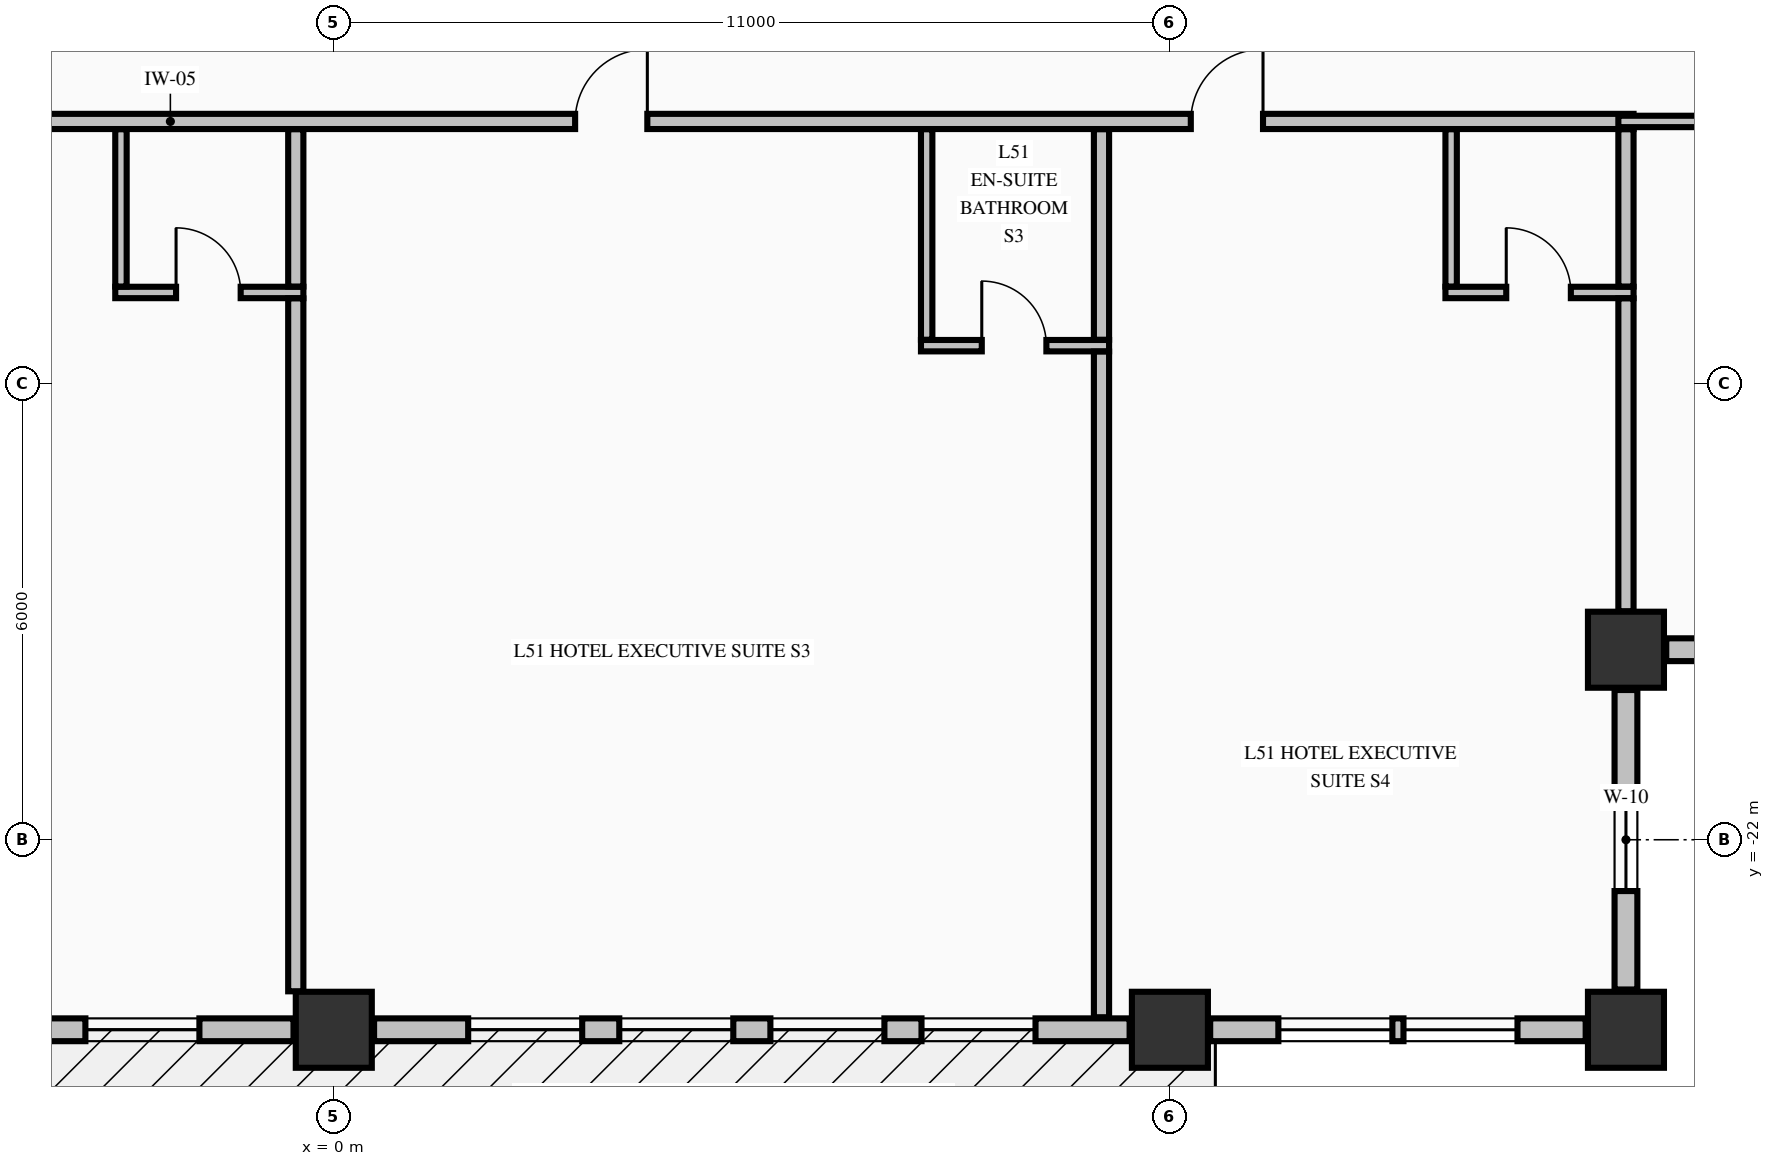
"""IFC4 building model, lengths in metres.
Left out: names, types, materials, properties, quantities, classifications, styles, units other than length and angle.
Written with IfcOpenShell. Run it as: python <this file> out.ifc"""

import sys

from ifc_helpers import new_model, si_unit, direction, frame, frame_2d, origin, origin_2d, place, context, subcontext, project, spatial, rectangle, extrude, element, fill, save


model = new_model("IFC4")
c1 = context("Model", 3, precision=1e-05, world=origin(), true_north=direction((0.0, 1.0)))
c2 = subcontext(c1, "Body", "Model", "MODEL_VIEW")
j1 = project(units=[si_unit("LENGTHUNIT", "METRE"), si_unit("PLANEANGLEUNIT", "RADIAN")], contexts=[c1])
p1 = place(None, origin())
s1 = spatial("IfcSite", under=j1, at=p1, CompositionType="ELEMENT")
p2 = place(p1, origin())
s2 = spatial("IfcBuilding", under=s1, at=p2, CompositionType="ELEMENT")
p3 = place(p2, frame((0.0, 0.0, 198.26)))
s3 = spatial("IfcBuildingStorey", under=s2, at=p3, CompositionType="ELEMENT", Elevation=198.26)
for number, where, z_axis, x_axis in (
    (1, (0.0, -24.5, -0.25), (0.0, 0.0, 1.0), (1.0, 0.0, 0.0)),
    (2, (11.0, -24.5, -0.25), (0.0, 0.0, 1.0), (1.0, 0.0, 0.0)),
    (3, (17.0, -24.5, -0.25), (0.0, 0.0, 1.0), (1.0, 0.0, 0.0)),
    (4, (17.0, -19.5, -0.25), (0.0, 0.0, 1.0), (1.0, 0.0, 0.0)),
):
    element("IfcColumn", number, at=place(p3, frame(where, z_axis=z_axis, x_axis=x_axis)), inside=s3, PredefinedType="COLUMN", context=c2, shape_type="SweptSolid", body=[
        extrude(rectangle(XDim=1.0, YDim=1.0, at=origin_2d()), origin(), (0.0, 0.0, 1.0), 3.4),
    ])
p4 = place(p3, frame((17.0, -23.97, 0.0), z_axis=(0.0, 0.0, 1.0), x_axis=(0.0, 1.0, 0.0)))
e5 = element("IfcWall", 5, at=p4, inside=s3, PredefinedType="STANDARD", context=c2, shape_type="SweptSolid", body=[
    extrude(rectangle(XDim=3.94, YDim=0.3, at=frame_2d((1.97, 0.0))), origin(), (0.0, 0.0, 1.0), 2.542),
])
p5 = place(p4, frame((1.295, 0.0, 0.68)))
e6 = element("IfcOpeningElement", 6, at=p5, cuts=e5, PredefinedType="OPENING", context=c2, shape_type="SweptSolid", body=[
    extrude(rectangle(XDim=1.35, YDim=1.42, at=frame_2d((0.675, 0.71))), frame((0.0, 0.16, 0.0), z_axis=(0.0, -1.0, 0.0), x_axis=(1.0, 0.0, 0.0)), (0.0, 0.0, 1.0), 0.32),
])
p6 = place(p3, frame((17.53, -19.5, 0.0), z_axis=(0.0, 0.0, 1.0), x_axis=(1.0, 0.0, 0.0)))
e7 = element("IfcWall", 7, at=p6, inside=s3, PredefinedType="STANDARD", context=c2, shape_type="SweptSolid", body=[
    extrude(rectangle(XDim=3.94, YDim=0.3, at=frame_2d((1.97, 0.0))), origin(), (0.0, 0.0, 1.0), 2.542),
])
p7 = place(p6, frame((1.295, 0.0, 0.68)))
e8 = element("IfcOpeningElement", 8, at=p7, cuts=e7, PredefinedType="OPENING", context=c2, shape_type="SweptSolid", body=[
    extrude(rectangle(XDim=1.35, YDim=1.42, at=frame_2d((0.675, 0.71))), frame((0.0, 0.16, 0.0), z_axis=(0.0, -1.0, 0.0), x_axis=(1.0, 0.0, 0.0)), (0.0, 0.0, 1.0), 0.32),
])
p8 = place(p3, frame((-10.47, -24.5, 0.0), z_axis=(0.0, 0.0, 1.0), x_axis=(1.0, 0.0, 0.0)))
e9 = element("IfcWall", 9, at=p8, inside=s3, PredefinedType="STANDARD", context=c2, shape_type="SweptSolid", body=[
    extrude(rectangle(XDim=9.94, YDim=0.3, at=frame_2d((4.97, 0.0))), origin(), (0.0, 0.0, 1.0), 2.542),
])
p9 = place(p8, frame((3.013, 0.0, 0.0)))
e10 = element("IfcOpeningElement", 10, at=p9, cuts=e9, PredefinedType="OPENING", context=c2, shape_type="SweptSolid", body=[
    extrude(rectangle(XDim=1.1, YDim=2.15, at=frame_2d((0.55, 1.075))), frame((0.0, 0.16, 0.0), z_axis=(0.0, -1.0, 0.0), x_axis=(1.0, 0.0, 0.0)), (0.0, 0.0, 1.0), 0.32),
])
p10 = place(p8, frame((5.214, 0.0, 0.72)))
e11 = element("IfcOpeningElement", 11, at=p10, cuts=e9, PredefinedType="OPENING", context=c2, shape_type="SweptSolid", body=[
    extrude(rectangle(XDim=1.5, YDim=1.6, at=frame_2d((0.75, 0.8))), frame((0.0, 0.16, 0.0), z_axis=(0.0, -1.0, 0.0), x_axis=(1.0, 0.0, 0.0)), (0.0, 0.0, 1.0), 0.32),
])
p11 = place(p8, frame((7.202, 0.0, 0.72)))
e12 = element("IfcOpeningElement", 12, at=p11, cuts=e9, PredefinedType="OPENING", context=c2, shape_type="SweptSolid", body=[
    extrude(rectangle(XDim=1.5, YDim=1.6, at=frame_2d((0.75, 0.8))), frame((0.0, 0.16, 0.0), z_axis=(0.0, -1.0, 0.0), x_axis=(1.0, 0.0, 0.0)), (0.0, 0.0, 1.0), 0.32),
])
p12 = place(p3, frame((0.53, -24.5, 0.0), z_axis=(0.0, 0.0, 1.0), x_axis=(1.0, 0.0, 0.0)))
e13 = element("IfcWall", 13, at=p12, inside=s3, PredefinedType="STANDARD", context=c2, shape_type="SweptSolid", body=[
    extrude(rectangle(XDim=9.94, YDim=0.3, at=frame_2d((4.97, 0.0))), origin(), (0.0, 0.0, 1.0), 2.542),
])
p13 = place(p12, frame((1.238, 0.0, 0.72)))
e14 = element("IfcOpeningElement", 14, at=p13, cuts=e13, PredefinedType="OPENING", context=c2, shape_type="SweptSolid", body=[
    extrude(rectangle(XDim=1.5, YDim=1.6, at=frame_2d((0.75, 0.8))), frame((0.0, 0.16, 0.0), z_axis=(0.0, -1.0, 0.0), x_axis=(1.0, 0.0, 0.0)), (0.0, 0.0, 1.0), 0.32),
])
p14 = place(p12, frame((3.226, 0.0, 0.72)))
e15 = element("IfcOpeningElement", 15, at=p14, cuts=e13, PredefinedType="OPENING", context=c2, shape_type="SweptSolid", body=[
    extrude(rectangle(XDim=1.5, YDim=1.6, at=frame_2d((0.75, 0.8))), frame((0.0, 0.16, 0.0), z_axis=(0.0, -1.0, 0.0), x_axis=(1.0, 0.0, 0.0)), (0.0, 0.0, 1.0), 0.32),
])
p15 = place(p12, frame((5.214, 0.0, 0.72)))
e16 = element("IfcOpeningElement", 16, at=p15, cuts=e13, PredefinedType="OPENING", context=c2, shape_type="SweptSolid", body=[
    extrude(rectangle(XDim=1.5, YDim=1.6, at=frame_2d((0.75, 0.8))), frame((0.0, 0.16, 0.0), z_axis=(0.0, -1.0, 0.0), x_axis=(1.0, 0.0, 0.0)), (0.0, 0.0, 1.0), 0.32),
])
p16 = place(p12, frame((7.202, 0.0, 0.72)))
e17 = element("IfcOpeningElement", 17, at=p16, cuts=e13, PredefinedType="OPENING", context=c2, shape_type="SweptSolid", body=[
    extrude(rectangle(XDim=1.5, YDim=1.6, at=frame_2d((0.75, 0.8))), frame((0.0, 0.16, 0.0), z_axis=(0.0, -1.0, 0.0), x_axis=(1.0, 0.0, 0.0)), (0.0, 0.0, 1.0), 0.32),
])
p17 = place(p3, frame((11.53, -24.5, 0.0), z_axis=(0.0, 0.0, 1.0), x_axis=(1.0, 0.0, 0.0)))
e18 = element("IfcWall", 18, at=p17, inside=s3, PredefinedType="STANDARD", context=c2, shape_type="SweptSolid", body=[
    extrude(rectangle(XDim=4.94, YDim=0.3, at=frame_2d((2.47, 0.0))), origin(), (0.0, 0.0, 1.0), 2.542),
])
p18 = place(p17, frame((0.897, 0.0, 0.72)))
e19 = element("IfcOpeningElement", 19, at=p18, cuts=e18, PredefinedType="OPENING", context=c2, shape_type="SweptSolid", body=[
    extrude(rectangle(XDim=1.5, YDim=1.6, at=frame_2d((0.75, 0.8))), frame((0.0, 0.16, 0.0), z_axis=(0.0, -1.0, 0.0), x_axis=(1.0, 0.0, 0.0)), (0.0, 0.0, 1.0), 0.32),
])
p19 = place(p17, frame((2.543, 0.0, 0.72)))
e20 = element("IfcOpeningElement", 20, at=p19, cuts=e18, PredefinedType="OPENING", context=c2, shape_type="SweptSolid", body=[
    extrude(rectangle(XDim=1.5, YDim=1.6, at=frame_2d((0.75, 0.8))), frame((0.0, 0.16, 0.0), z_axis=(0.0, -1.0, 0.0), x_axis=(1.0, 0.0, 0.0)), (0.0, 0.0, 1.0), 0.32),
])
p20 = place(p3, frame((7.725, -15.5, 0.0), z_axis=(0.0, 0.0, 1.0), x_axis=(1.0, 0.0, 0.0)))
e21 = element("IfcWall", 21, at=p20, inside=s3, PredefinedType="PARTITIONING", context=c2, shape_type="SweptSolid", body=[
    extrude(rectangle(XDim=2.475, YDim=0.15, at=frame_2d((1.237, 0.0))), origin(), (0.0, 0.0, 1.0), 3.15),
])
p21 = place(p20, frame((0.8, 0.0, 0.0)))
e22 = element("IfcOpeningElement", 22, at=p21, cuts=e21, PredefinedType="OPENING", context=c2, shape_type="SweptSolid", body=[
    extrude(rectangle(XDim=0.85, YDim=2.1, at=frame_2d((0.425, 1.05))), frame((0.0, 0.085, 0.0), z_axis=(0.0, -1.0, 0.0), x_axis=(1.0, 0.0, 0.0)), (0.0, 0.0, 1.0), 0.17),
])
p22 = place(p3, frame((-2.875, -14.8, 0.0), z_axis=(0.0, 0.0, 1.0), x_axis=(1.0, 0.0, 0.0)))
e23 = element("IfcWall", 23, at=p22, inside=s3, PredefinedType="PARTITIONING", context=c2, shape_type="SweptSolid", body=[
    extrude(rectangle(XDim=2.475, YDim=0.15, at=frame_2d((1.238, 0.0))), origin(), (0.0, 0.0, 1.0), 3.15),
])
p23 = place(p22, frame((0.8, 0.0, 0.0)))
e24 = element("IfcOpeningElement", 24, at=p23, cuts=e23, PredefinedType="OPENING", context=c2, shape_type="SweptSolid", body=[
    extrude(rectangle(XDim=0.85, YDim=2.1, at=frame_2d((0.425, 1.05))), frame((0.0, 0.085, 0.0), z_axis=(0.0, -1.0, 0.0), x_axis=(1.0, 0.0, 0.0)), (0.0, 0.0, 1.0), 0.17),
])
p24 = place(p3, frame((14.625, -14.8, 0.0), z_axis=(0.0, 0.0, 1.0), x_axis=(1.0, 0.0, 0.0)))
e25 = element("IfcWall", 25, at=p24, inside=s3, PredefinedType="PARTITIONING", context=c2, shape_type="SweptSolid", body=[
    extrude(rectangle(XDim=2.475, YDim=0.15, at=frame_2d((1.238, 0.0))), origin(), (0.0, 0.0, 1.0), 3.15),
])
p25 = place(p24, frame((0.8, 0.0, 0.0)))
e26 = element("IfcOpeningElement", 26, at=p25, cuts=e25, PredefinedType="OPENING", context=c2, shape_type="SweptSolid", body=[
    extrude(rectangle(XDim=0.85, YDim=2.1, at=frame_2d((0.425, 1.05))), frame((0.0, 0.085, 0.0), z_axis=(0.0, -1.0, 0.0), x_axis=(1.0, 0.0, 0.0)), (0.0, 0.0, 1.0), 0.17),
])
p26 = place(p3, frame((-22.1, -12.55, 0.0), z_axis=(0.0, 0.0, 1.0), x_axis=(1.0, 0.0, 0.0)))
e27 = element("IfcWall", 27, at=p26, inside=s3, PredefinedType="PARTITIONING", context=c2, shape_type="SweptSolid", body=[
    extrude(rectangle(XDim=39.2, YDim=0.2, at=frame_2d((19.6, 0.0))), origin(), (0.0, 0.0, 1.0), 3.15),
])
p27 = place(p26, frame((4.025, 0.0, 0.0)))
e28 = element("IfcOpeningElement", 28, at=p27, cuts=e27, PredefinedType="OPENING", context=c2, shape_type="SweptSolid", body=[
    extrude(rectangle(XDim=0.95, YDim=2.15, at=frame_2d((0.475, 1.075))), frame((0.0, 0.11, 0.0), z_axis=(0.0, -1.0, 0.0), x_axis=(1.0, 0.0, 0.0)), (0.0, 0.0, 1.0), 0.22),
])
p28 = place(p26, frame((13.675, 0.0, 0.0)))
e29 = element("IfcOpeningElement", 29, at=p28, cuts=e27, PredefinedType="OPENING", context=c2, shape_type="SweptSolid", body=[
    extrude(rectangle(XDim=0.95, YDim=2.15, at=frame_2d((0.475, 1.075))), frame((0.0, 0.11, 0.0), z_axis=(0.0, -1.0, 0.0), x_axis=(1.0, 0.0, 0.0)), (0.0, 0.0, 1.0), 0.22),
])
p29 = place(p26, frame((25.275, 0.0, 0.0)))
e30 = element("IfcOpeningElement", 30, at=p29, cuts=e27, PredefinedType="OPENING", context=c2, shape_type="SweptSolid", body=[
    extrude(rectangle(XDim=0.95, YDim=2.15, at=frame_2d((0.475, 1.075))), frame((0.0, 0.11, 0.0), z_axis=(0.0, -1.0, 0.0), x_axis=(1.0, 0.0, 0.0)), (0.0, 0.0, 1.0), 0.22),
])
p30 = place(p26, frame((33.375, 0.0, 0.0)))
e31 = element("IfcOpeningElement", 31, at=p30, cuts=e27, PredefinedType="OPENING", context=c2, shape_type="SweptSolid", body=[
    extrude(rectangle(XDim=0.95, YDim=2.15, at=frame_2d((0.475, 1.075))), frame((0.0, 0.11, 0.0), z_axis=(0.0, -1.0, 0.0), x_axis=(1.0, 0.0, 0.0)), (0.0, 0.0, 1.0), 0.22),
])
p31 = place(p3, frame((16.9, -12.55, 0.0), z_axis=(0.0, 0.0, 1.0), x_axis=(1.0, 0.0, 0.0)))
e32 = element("IfcWall", 32, at=p31, inside=s3, PredefinedType="PARTITIONING", context=c2, shape_type="SweptSolid", body=[
    extrude(rectangle(XDim=3.175, YDim=0.15, at=frame_2d((1.587, 0.0))), origin(), (0.0, 0.0, 1.0), 3.15),
])
p32 = place(p3, frame((-2.8, -14.722, 0.0), z_axis=(0.0, 0.0, 1.0), x_axis=(0.0, 1.0, 0.0)))
e33 = element("IfcWall", 33, at=p32, inside=s3, PredefinedType="PARTITIONING", context=c2, shape_type="SweptSolid", body=[
    extrude(rectangle(XDim=2.069, YDim=0.15, at=frame_2d((1.034, 0.0))), origin(), (0.0, 0.0, 1.0), 3.15),
])
p33 = place(p3, frame((-0.5, -23.994, 0.0), z_axis=(0.0, 0.0, 1.0), x_axis=(0.0, 1.0, 0.0)))
e34 = element("IfcWall", 34, at=p33, inside=s3, PredefinedType="PARTITIONING", context=c2, shape_type="SweptSolid", body=[
    extrude(rectangle(XDim=9.116, YDim=0.2, at=frame_2d((4.558, 0.0))), origin(), (0.0, 0.0, 1.0), 3.15),
])
p34 = place(p3, frame((-0.5, -14.722, 0.0), z_axis=(0.0, 0.0, 1.0), x_axis=(0.0, 1.0, 0.0)))
e35 = element("IfcWall", 35, at=p34, inside=s3, PredefinedType="PARTITIONING", context=c2, shape_type="SweptSolid", body=[
    extrude(rectangle(XDim=2.069, YDim=0.2, at=frame_2d((1.034, 0.0))), origin(), (0.0, 0.0, 1.0), 3.15),
])
p35 = place(p3, frame((7.8, -15.422, 0.0), z_axis=(0.0, 0.0, 1.0), x_axis=(0.0, 1.0, 0.0)))
e36 = element("IfcWall", 36, at=p35, inside=s3, PredefinedType="PARTITIONING", context=c2, shape_type="SweptSolid", body=[
    extrude(rectangle(XDim=2.769, YDim=0.15, at=frame_2d((1.385, 0.0))), origin(), (0.0, 0.0, 1.0), 3.15),
])
p36 = place(p3, frame((10.1, -24.335, 0.0), z_axis=(0.0, 0.0, 1.0), x_axis=(0.0, 1.0, 0.0)))
e37 = element("IfcWall", 37, at=p36, inside=s3, PredefinedType="PARTITIONING", context=c2, shape_type="SweptSolid", body=[
    extrude(rectangle(XDim=8.757, YDim=0.2, at=frame_2d((4.378, 0.0))), origin(), (0.0, 0.0, 1.0), 3.15),
])
p37 = place(p3, frame((10.1, -15.422, 0.0), z_axis=(0.0, 0.0, 1.0), x_axis=(0.0, 1.0, 0.0)))
e38 = element("IfcWall", 38, at=p37, inside=s3, PredefinedType="PARTITIONING", context=c2, shape_type="SweptSolid", body=[
    extrude(rectangle(XDim=2.769, YDim=0.2, at=frame_2d((1.385, 0.0))), origin(), (0.0, 0.0, 1.0), 3.15),
])
p38 = place(p3, frame((14.7, -14.722, 0.0), z_axis=(0.0, 0.0, 1.0), x_axis=(0.0, 1.0, 0.0)))
e39 = element("IfcWall", 39, at=p38, inside=s3, PredefinedType="PARTITIONING", context=c2, shape_type="SweptSolid", body=[
    extrude(rectangle(XDim=2.069, YDim=0.15, at=frame_2d((1.034, 0.0))), origin(), (0.0, 0.0, 1.0), 3.15),
])
p39 = place(p3, frame((17.0, -18.994, 0.0), z_axis=(0.0, 0.0, 1.0), x_axis=(0.0, 1.0, 0.0)))
e40 = element("IfcWall", 40, at=p39, inside=s3, PredefinedType="PARTITIONING", context=c2, shape_type="SweptSolid", body=[
    extrude(rectangle(XDim=4.116, YDim=0.2, at=frame_2d((2.058, 0.0))), origin(), (0.0, 0.0, 1.0), 3.15),
])
p40 = place(p3, frame((17.0, -14.722, 0.0), z_axis=(0.0, 0.0, 1.0), x_axis=(0.0, 1.0, 0.0)))
e41 = element("IfcWall", 41, at=p40, inside=s3, PredefinedType="PARTITIONING", context=c2, shape_type="SweptSolid", body=[
    extrude(rectangle(XDim=2.069, YDim=0.2, at=frame_2d((1.034, 0.0))), origin(), (0.0, 0.0, 1.0), 3.15),
])
p41 = place(p5, origin())
e42 = element("IfcWindow", 42, at=p41, inside=s3, PartitioningType="SINGLE_PANEL", PredefinedType="WINDOW", context=c2, shape_type="SweptSolid", body=[
    extrude(rectangle(XDim=1.35, YDim=1.42, at=frame_2d((0.675, 0.71))), frame((0.0, 0.03, 0.0), z_axis=(0.0, -1.0, 0.0), x_axis=(1.0, 0.0, 0.0)), (0.0, 0.0, 1.0), 0.06),
])
fill(e6, e42)
p42 = place(p11, origin())
e43 = element("IfcWindow", 43, at=p42, inside=s3, PartitioningType="SINGLE_PANEL", PredefinedType="WINDOW", context=c2, shape_type="SweptSolid", body=[
    extrude(rectangle(XDim=1.5, YDim=1.6, at=frame_2d((0.75, 0.8))), frame((0.0, 0.03, 0.0), z_axis=(0.0, -1.0, 0.0), x_axis=(1.0, 0.0, 0.0)), (0.0, 0.0, 1.0), 0.06),
])
fill(e12, e43)
p43 = place(p13, origin())
e44 = element("IfcWindow", 44, at=p43, inside=s3, PartitioningType="SINGLE_PANEL", PredefinedType="WINDOW", context=c2, shape_type="SweptSolid", body=[
    extrude(rectangle(XDim=1.5, YDim=1.6, at=frame_2d((0.75, 0.8))), frame((0.0, 0.03, 0.0), z_axis=(0.0, -1.0, 0.0), x_axis=(1.0, 0.0, 0.0)), (0.0, 0.0, 1.0), 0.06),
])
fill(e14, e44)
p44 = place(p14, origin())
e45 = element("IfcWindow", 45, at=p44, inside=s3, PartitioningType="SINGLE_PANEL", PredefinedType="WINDOW", context=c2, shape_type="SweptSolid", body=[
    extrude(rectangle(XDim=1.5, YDim=1.6, at=frame_2d((0.75, 0.8))), frame((0.0, 0.03, 0.0), z_axis=(0.0, -1.0, 0.0), x_axis=(1.0, 0.0, 0.0)), (0.0, 0.0, 1.0), 0.06),
])
fill(e15, e45)
p45 = place(p15, origin())
e46 = element("IfcWindow", 46, at=p45, inside=s3, PartitioningType="SINGLE_PANEL", PredefinedType="WINDOW", context=c2, shape_type="SweptSolid", body=[
    extrude(rectangle(XDim=1.5, YDim=1.6, at=frame_2d((0.75, 0.8))), frame((0.0, 0.03, 0.0), z_axis=(0.0, -1.0, 0.0), x_axis=(1.0, 0.0, 0.0)), (0.0, 0.0, 1.0), 0.06),
])
fill(e16, e46)
p46 = place(p16, origin())
e47 = element("IfcWindow", 47, at=p46, inside=s3, PartitioningType="SINGLE_PANEL", PredefinedType="WINDOW", context=c2, shape_type="SweptSolid", body=[
    extrude(rectangle(XDim=1.5, YDim=1.6, at=frame_2d((0.75, 0.8))), frame((0.0, 0.03, 0.0), z_axis=(0.0, -1.0, 0.0), x_axis=(1.0, 0.0, 0.0)), (0.0, 0.0, 1.0), 0.06),
])
fill(e17, e47)
p47 = place(p18, origin())
e48 = element("IfcWindow", 48, at=p47, inside=s3, PartitioningType="SINGLE_PANEL", PredefinedType="WINDOW", context=c2, shape_type="SweptSolid", body=[
    extrude(rectangle(XDim=1.5, YDim=1.6, at=frame_2d((0.75, 0.8))), frame((0.0, 0.03, 0.0), z_axis=(0.0, -1.0, 0.0), x_axis=(1.0, 0.0, 0.0)), (0.0, 0.0, 1.0), 0.06),
])
fill(e19, e48)
p48 = place(p19, origin())
e49 = element("IfcWindow", 49, at=p48, inside=s3, PartitioningType="SINGLE_PANEL", PredefinedType="WINDOW", context=c2, shape_type="SweptSolid", body=[
    extrude(rectangle(XDim=1.5, YDim=1.6, at=frame_2d((0.75, 0.8))), frame((0.0, 0.03, 0.0), z_axis=(0.0, -1.0, 0.0), x_axis=(1.0, 0.0, 0.0)), (0.0, 0.0, 1.0), 0.06),
])
fill(e20, e49)
p49 = place(p23, origin())
e50 = element("IfcDoor", 50, at=p49, inside=s3, OperationType="SINGLE_SWING_LEFT", PredefinedType="DOOR", context=c2, shape_type="SweptSolid", body=[
    extrude(rectangle(XDim=0.85, YDim=2.1, at=frame_2d((0.425, 1.05))), frame((0.0, 0.025, 0.0), z_axis=(0.0, -1.0, 0.0), x_axis=(1.0, 0.0, 0.0)), (0.0, 0.0, 1.0), 0.05),
])
fill(e24, e50)
p50 = place(p29, origin())
e51 = element("IfcDoor", 51, at=p50, inside=s3, OperationType="SINGLE_SWING_RIGHT", PredefinedType="DOOR", context=c2, shape_type="SweptSolid", body=[
    extrude(rectangle(XDim=0.95, YDim=2.15, at=frame_2d((0.475, 1.075))), frame((0.0, 0.025, 0.0), z_axis=(0.0, -1.0, 0.0), x_axis=(1.0, 0.0, 0.0)), (0.0, 0.0, 1.0), 0.05),
])
fill(e30, e51)
p51 = place(p21, origin())
e52 = element("IfcDoor", 52, at=p51, inside=s3, OperationType="SINGLE_SWING_LEFT", PredefinedType="DOOR", context=c2, shape_type="SweptSolid", body=[
    extrude(rectangle(XDim=0.85, YDim=2.1, at=frame_2d((0.425, 1.05))), frame((0.0, 0.025, 0.0), z_axis=(0.0, -1.0, 0.0), x_axis=(1.0, 0.0, 0.0)), (0.0, 0.0, 1.0), 0.05),
])
fill(e22, e52)
p52 = place(p30, origin())
e53 = element("IfcDoor", 53, at=p52, inside=s3, OperationType="SINGLE_SWING_RIGHT", PredefinedType="DOOR", context=c2, shape_type="SweptSolid", body=[
    extrude(rectangle(XDim=0.95, YDim=2.15, at=frame_2d((0.475, 1.075))), frame((0.0, 0.025, 0.0), z_axis=(0.0, -1.0, 0.0), x_axis=(1.0, 0.0, 0.0)), (0.0, 0.0, 1.0), 0.05),
])
fill(e31, e53)
p53 = place(p25, origin())
e54 = element("IfcDoor", 54, at=p53, inside=s3, OperationType="SINGLE_SWING_LEFT", PredefinedType="DOOR", context=c2, shape_type="SweptSolid", body=[
    extrude(rectangle(XDim=0.85, YDim=2.1, at=frame_2d((0.425, 1.05))), frame((0.0, 0.025, 0.0), z_axis=(0.0, -1.0, 0.0), x_axis=(1.0, 0.0, 0.0)), (0.0, 0.0, 1.0), 0.05),
])
fill(e26, e54)
save(model, sys.argv[1])
